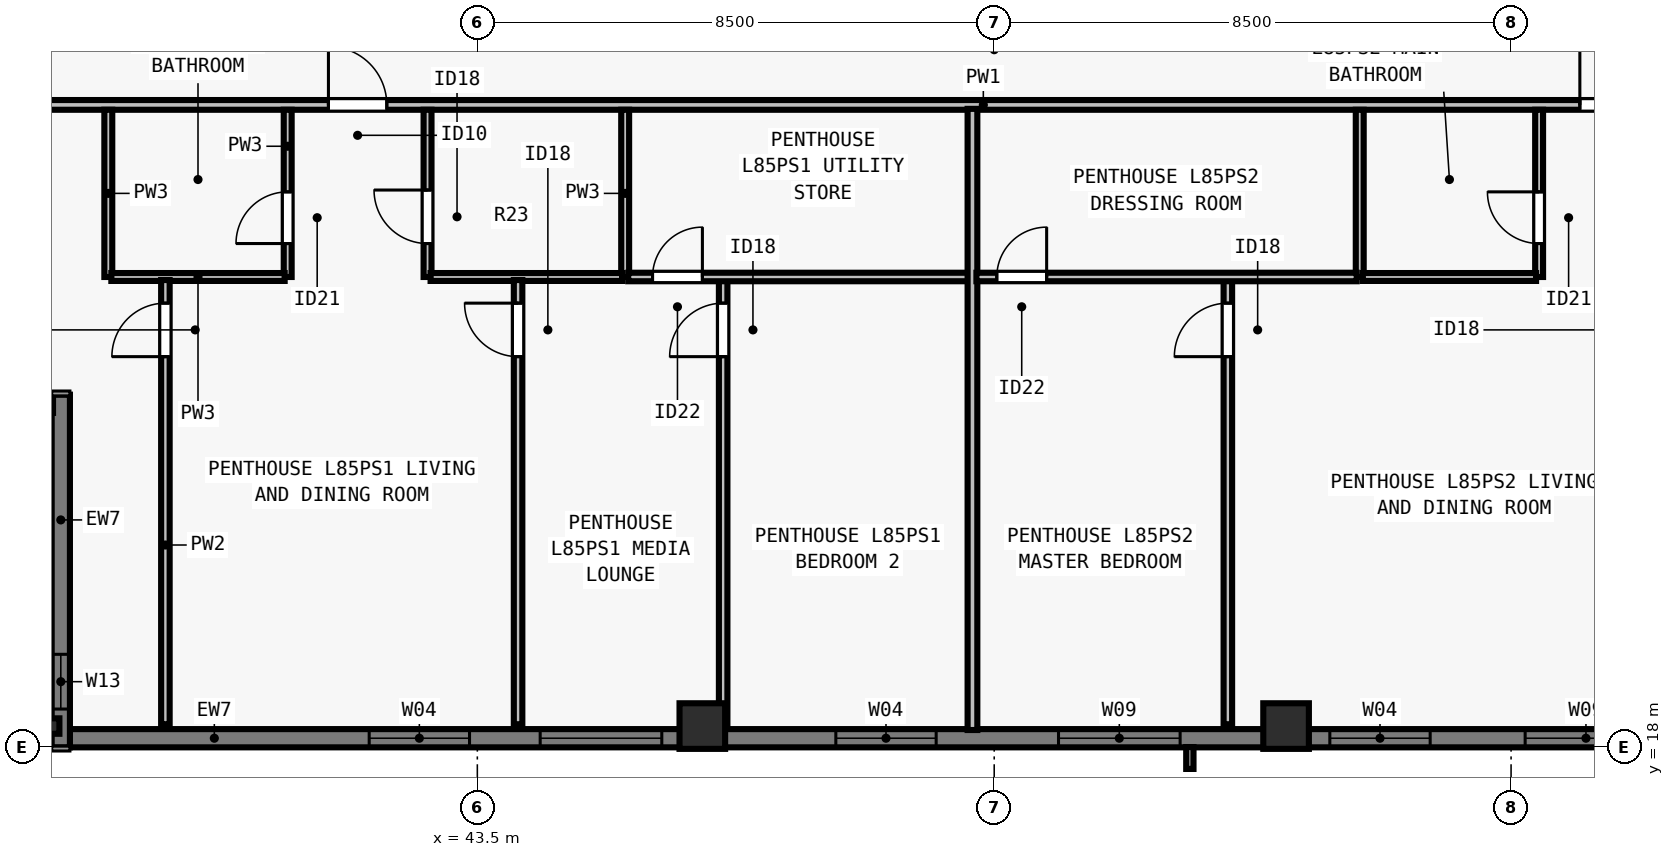
"""IFC4 building model, lengths in metres.
Left out: names, types, materials, properties, quantities, classifications, styles, units other than length and angle.
Written with IfcOpenShell. Run it as: python <this file> out.ifc"""

import sys

from ifc_helpers import new_model, si_unit, direction, frame, frame_2d, origin, origin_2d, place, context, subcontext, project, spatial, rectangle, i_section, extrude, element, fill, save


model = new_model("IFC4")
c1 = context("Model", 3, precision=1e-05, world=origin(), true_north=direction((0.0, 1.0)))
c2 = subcontext(c1, "Body", "Model", "MODEL_VIEW")
j1 = project(units=[si_unit("LENGTHUNIT", "METRE"), si_unit("PLANEANGLEUNIT", "RADIAN")], contexts=[c1])
p1 = place(None, origin())
s1 = spatial("IfcSite", under=j1, at=p1, CompositionType="ELEMENT")
p2 = place(p1, origin())
s2 = spatial("IfcBuilding", under=s1, at=p2, CompositionType="ELEMENT")
p3 = place(p2, frame((0.0, 0.0, 308.5)))
s3 = spatial("IfcBuildingStorey", under=s2, at=p3, CompositionType="ELEMENT", Elevation=308.5)
p4 = place(p3, frame((36.5, 18.35, 0.0), z_axis=(0.0, 0.0, 1.0), x_axis=(1.0, 0.0, 0.0)))
e1 = element("IfcColumn", 1, at=p4, inside=s3, PredefinedType="COLUMN", context=c2, shape_type="SweptSolid", body=[
    extrude(i_section(OverallWidth=0.254, OverallDepth=0.254, WebThickness=0.009, FlangeThickness=0.014, FilletRadius=0.013, at=origin_2d()), origin(), (0.0, 0.0, 1.0), 3.5),
])
for number, where, z_axis, x_axis in (
    (2, (47.2, 18.35, 0.0), (0.0, 0.0, 1.0), (1.0, 0.0, 0.0)),
    (3, (56.8, 18.35, 0.0), (0.0, 0.0, 1.0), (1.0, 0.0, 0.0)),
):
    element("IfcColumn", number, at=place(p3, frame(where, z_axis=z_axis, x_axis=x_axis)), inside=s3, PredefinedType="COLUMN", context=c2, shape_type="SweptSolid", body=[
        extrude(rectangle(XDim=0.75, YDim=0.75, at=origin_2d()), origin(), (0.0, 0.0, 1.0), 3.5),
    ])
p5 = place(p3, frame((67.5, 18.15, 0.0), z_axis=(0.0, 0.0, 1.0), x_axis=(-1.0, 0.0, 0.0)))
e4 = element("IfcWall", 4, at=p5, inside=s3, PredefinedType="SOLIDWALL", context=c2, shape_type="SweptSolid", body=[
    extrude(rectangle(XDim=30.722, YDim=0.3, at=frame_2d((15.361, 0.0))), origin(), (0.0, 0.0, 1.0), 3.29),
])
p6 = place(p5, frame((4.769, 0.0, 0.8)))
e5 = element("IfcOpeningElement", 5, at=p6, cuts=e4, PredefinedType="OPENING", context=c2, shape_type="SweptSolid", body=[
    extrude(rectangle(XDim=2.0, YDim=1.758, at=frame_2d((1.0, 0.879))), frame((0.0, 0.16, 0.0), z_axis=(0.0, -1.0, 0.0), x_axis=(1.0, 0.0, 0.0)), (0.0, 0.0, 1.0), 0.32),
])
p7 = place(p5, frame((8.331, 0.0, 0.8)))
e6 = element("IfcOpeningElement", 6, at=p7, cuts=e4, PredefinedType="OPENING", context=c2, shape_type="SweptSolid", body=[
    extrude(rectangle(XDim=1.65, YDim=1.758, at=frame_2d((0.825, 0.879))), frame((0.0, 0.16, 0.0), z_axis=(0.0, -1.0, 0.0), x_axis=(1.0, 0.0, 0.0)), (0.0, 0.0, 1.0), 0.32),
])
p8 = place(p5, frame((12.442, 0.0, 0.8)))
e7 = element("IfcOpeningElement", 7, at=p8, cuts=e4, PredefinedType="OPENING", context=c2, shape_type="SweptSolid", body=[
    extrude(rectangle(XDim=2.0, YDim=1.758, at=frame_2d((1.0, 0.879))), frame((0.0, 0.16, 0.0), z_axis=(0.0, -1.0, 0.0), x_axis=(1.0, 0.0, 0.0)), (0.0, 0.0, 1.0), 0.32),
])
p9 = place(p5, frame((16.455, 0.0, 0.8)))
e8 = element("IfcOpeningElement", 8, at=p9, cuts=e4, PredefinedType="OPENING", context=c2, shape_type="SweptSolid", body=[
    extrude(rectangle(XDim=1.65, YDim=1.758, at=frame_2d((0.825, 0.879))), frame((0.0, 0.16, 0.0), z_axis=(0.0, -1.0, 0.0), x_axis=(1.0, 0.0, 0.0)), (0.0, 0.0, 1.0), 0.32),
])
p10 = place(p5, frame((20.967, 0.0, 0.8)))
e9 = element("IfcOpeningElement", 9, at=p10, cuts=e4, PredefinedType="OPENING", context=c2, shape_type="SweptSolid", body=[
    extrude(rectangle(XDim=2.0, YDim=1.758, at=frame_2d((1.0, 0.879))), frame((0.0, 0.16, 0.0), z_axis=(0.0, -1.0, 0.0), x_axis=(1.0, 0.0, 0.0)), (0.0, 0.0, 1.0), 0.32),
])
p11 = place(p5, frame((24.128, 0.0, 0.8)))
e10 = element("IfcOpeningElement", 10, at=p11, cuts=e4, PredefinedType="OPENING", context=c2, shape_type="SweptSolid", body=[
    extrude(rectangle(XDim=1.65, YDim=1.758, at=frame_2d((0.825, 0.879))), frame((0.0, 0.16, 0.0), z_axis=(0.0, -1.0, 0.0), x_axis=(1.0, 0.0, 0.0)), (0.0, 0.0, 1.0), 0.32),
])
p12 = place(p3, frame((36.65, 18.0, 0.0), z_axis=(0.0, 0.0, 1.0), x_axis=(0.0, 1.0, 0.0)))
e11 = element("IfcWall", 11, at=p12, inside=s3, PredefinedType="SOLIDWALL", context=c2, shape_type="SweptSolid", body=[
    extrude(rectangle(XDim=5.8, YDim=0.3, at=frame_2d((2.9, 0.0))), origin(), (0.0, 0.0, 1.0), 3.29),
])
p13 = place(p12, frame((0.63, 0.0, 0.8)))
e12 = element("IfcOpeningElement", 12, at=p13, cuts=e11, PredefinedType="OPENING", context=c2, shape_type="SweptSolid", body=[
    extrude(rectangle(XDim=0.9, YDim=1.75, at=frame_2d((0.45, 0.875))), frame((0.0, 0.16, 0.0), z_axis=(0.0, -1.0, 0.0), x_axis=(1.0, 0.0, 0.0)), (0.0, 0.0, 1.0), 0.32),
])
p14 = place(p3, frame((36.522, 23.65, 0.0), z_axis=(0.0, 0.0, 1.0), x_axis=(-1.0, 0.0, 0.0)))
e13 = element("IfcWall", 13, at=p14, inside=s3, PredefinedType="SOLIDWALL", context=c2, shape_type="SweptSolid", body=[
    extrude(rectangle(XDim=5.244, YDim=0.3, at=frame_2d((2.622, 0.0))), origin(), (0.0, 0.0, 1.0), 3.29),
])
p15 = place(p3, frame((31.285, 28.565, 0.0), z_axis=(0.0, 0.0, 1.0), x_axis=(1.0, 0.0, 0.0)))
e14 = element("IfcWall", 14, at=p15, inside=s3, PredefinedType="PARTITIONING", context=c2, shape_type="SweptSolid", body=[
    extrude(rectangle(XDim=41.43, YDim=0.16, at=frame_2d((20.715, 0.0))), origin(), (0.0, 0.0, 1.0), 3.009),
])
p16 = place(p15, frame((9.766, 0.0, 0.0)))
e15 = element("IfcOpeningElement", 15, at=p16, cuts=e14, PredefinedType="OPENING", context=c2, shape_type="SweptSolid", body=[
    extrude(rectangle(XDim=0.96, YDim=2.18, at=frame_2d((0.48, 1.09))), frame((0.0, 0.09, 0.0), z_axis=(0.0, -1.0, 0.0), x_axis=(1.0, 0.0, 0.0)), (0.0, 0.0, 1.0), 0.18),
])
p17 = place(p15, frame((30.346, 0.0, 0.0)))
e16 = element("IfcOpeningElement", 16, at=p17, cuts=e14, PredefinedType="OPENING", context=c2, shape_type="SweptSolid", body=[
    extrude(rectangle(XDim=0.96, YDim=2.18, at=frame_2d((0.48, 1.09))), frame((0.0, 0.09, 0.0), z_axis=(0.0, -1.0, 0.0), x_axis=(1.0, 0.0, 0.0)), (0.0, 0.0, 1.0), 0.18),
])
p18 = place(p3, frame((37.431, 25.735, 0.0), z_axis=(0.0, 0.0, 1.0), x_axis=(0.0, 1.0, 0.0)))
e17 = element("IfcWall", 17, at=p18, inside=s3, PredefinedType="PLUMBINGWALL", context=c2, shape_type="SweptSolid", body=[
    extrude(rectangle(XDim=2.75, YDim=0.13, at=frame_2d((1.375, 0.0))), origin(), (0.0, 0.0, 1.0), 3.29),
])
p19 = place(p3, frame((40.381, 25.735, 0.0), z_axis=(0.0, 0.0, 1.0), x_axis=(0.0, 1.0, 0.0)))
e18 = element("IfcWall", 18, at=p19, inside=s3, PredefinedType="PLUMBINGWALL", context=c2, shape_type="SweptSolid", body=[
    extrude(rectangle(XDim=2.75, YDim=0.13, at=frame_2d((1.375, 0.0))), origin(), (0.0, 0.0, 1.0), 3.29),
])
p20 = place(p19, frame((0.55, 0.0, 0.0)))
e19 = element("IfcOpeningElement", 19, at=p20, cuts=e18, PredefinedType="OPENING", context=c2, shape_type="SweptSolid", body=[
    extrude(rectangle(XDim=0.85, YDim=2.08, at=frame_2d((0.425, 1.04))), frame((0.0, 0.075, 0.0), z_axis=(0.0, -1.0, 0.0), x_axis=(1.0, 0.0, 0.0)), (0.0, 0.0, 1.0), 0.15),
])
p21 = place(p3, frame((37.481, 25.735, 0.0), z_axis=(0.0, 0.0, 1.0), x_axis=(1.0, 0.0, 0.0)))
e20 = element("IfcWall", 20, at=p21, inside=s3, PredefinedType="PLUMBINGWALL", context=c2, shape_type="SweptSolid", body=[
    extrude(rectangle(XDim=2.85, YDim=0.13, at=frame_2d((1.425, 0.0))), origin(), (0.0, 0.0, 1.0), 3.29),
])
p22 = place(p3, frame((45.931, 25.735, 0.0), z_axis=(0.0, 0.0, 1.0), x_axis=(0.0, 1.0, 0.0)))
e21 = element("IfcWall", 21, at=p22, inside=s3, PredefinedType="PLUMBINGWALL", context=c2, shape_type="SweptSolid", body=[
    extrude(rectangle(XDim=2.75, YDim=0.13, at=frame_2d((1.375, 0.0))), origin(), (0.0, 0.0, 1.0), 3.29),
])
p23 = place(p3, frame((42.681, 25.735, 0.0), z_axis=(0.0, 0.0, 1.0), x_axis=(0.0, 1.0, 0.0)))
e22 = element("IfcWall", 22, at=p23, inside=s3, PredefinedType="PLUMBINGWALL", context=c2, shape_type="SweptSolid", body=[
    extrude(rectangle(XDim=2.75, YDim=0.13, at=frame_2d((1.375, 0.0))), origin(), (0.0, 0.0, 1.0), 3.29),
])
p24 = place(p23, frame((0.55, 0.0, 0.0)))
e23 = element("IfcOpeningElement", 23, at=p24, cuts=e22, PredefinedType="OPENING", context=c2, shape_type="SweptSolid", body=[
    extrude(rectangle(XDim=0.88, YDim=2.1, at=frame_2d((0.44, 1.05))), frame((0.0, 0.075, 0.0), z_axis=(0.0, -1.0, 0.0), x_axis=(1.0, 0.0, 0.0)), (0.0, 0.0, 1.0), 0.15),
])
p25 = place(p3, frame((42.731, 25.735, 0.0), z_axis=(0.0, 0.0, 1.0), x_axis=(1.0, 0.0, 0.0)))
e24 = element("IfcWall", 24, at=p25, inside=s3, PredefinedType="PLUMBINGWALL", context=c2, shape_type="SweptSolid", body=[
    extrude(rectangle(XDim=3.15, YDim=0.13, at=frame_2d((1.575, 0.0))), origin(), (0.0, 0.0, 1.0), 3.29),
])
p26 = place(p3, frame((38.37, 18.38, 0.0), z_axis=(0.0, 0.0, 1.0), x_axis=(0.0, 1.0, 0.0)))
e25 = element("IfcWall", 25, at=p26, inside=s3, PredefinedType="PARTITIONING", context=c2, shape_type="SweptSolid", body=[
    extrude(rectangle(XDim=7.305, YDim=0.14, at=frame_2d((3.653, 0.0))), origin(), (0.0, 0.0, 1.0), 2.653),
])
p27 = place(p26, frame((6.045, 0.0, 0.0)))
e26 = element("IfcOpeningElement", 26, at=p27, cuts=e25, PredefinedType="OPENING", context=c2, shape_type="SweptSolid", body=[
    extrude(rectangle(XDim=0.88, YDim=2.1, at=frame_2d((0.44, 1.05))), frame((0.0, 0.08, 0.0), z_axis=(0.0, -1.0, 0.0), x_axis=(1.0, 0.0, 0.0)), (0.0, 0.0, 1.0), 0.16),
])
p28 = place(p3, frame((47.542, 18.38, 0.0), z_axis=(0.0, 0.0, 1.0), x_axis=(0.0, 1.0, 0.0)))
e27 = element("IfcWall", 27, at=p28, inside=s3, PredefinedType="PARTITIONING", context=c2, shape_type="SweptSolid", body=[
    extrude(rectangle(XDim=7.395, YDim=0.14, at=frame_2d((3.698, 0.0))), origin(), (0.0, 0.0, 1.0), 3.009),
])
p29 = place(p28, frame((6.045, 0.0, 0.0)))
e28 = element("IfcOpeningElement", 28, at=p29, cuts=e27, PredefinedType="OPENING", context=c2, shape_type="SweptSolid", body=[
    extrude(rectangle(XDim=0.88, YDim=2.1, at=frame_2d((0.44, 1.05))), frame((0.0, 0.08, 0.0), z_axis=(0.0, -1.0, 0.0), x_axis=(1.0, 0.0, 0.0)), (0.0, 0.0, 1.0), 0.16),
])
p30 = place(p3, frame((45.981, 25.735, 0.0), z_axis=(0.0, 0.0, 1.0), x_axis=(1.0, 0.0, 0.0)))
e29 = element("IfcWall", 29, at=p30, inside=s3, PredefinedType="PARTITIONING", context=c2, shape_type="SweptSolid", body=[
    extrude(rectangle(XDim=5.711, YDim=0.14, at=frame_2d((2.855, 0.0))), origin(), (0.0, 0.0, 1.0), 3.29),
])
p31 = place(p30, frame((0.4, 0.0, 0.0)))
e30 = element("IfcOpeningElement", 30, at=p31, cuts=e29, PredefinedType="OPENING", context=c2, shape_type="SweptSolid", body=[
    extrude(rectangle(XDim=0.82, YDim=2.1, at=frame_2d((0.41, 1.05))), frame((0.0, 0.08, 0.0), z_axis=(0.0, -1.0, 0.0), x_axis=(1.0, 0.0, 0.0)), (0.0, 0.0, 1.0), 0.16),
])
p32 = place(p3, frame((44.17, 18.38, 0.0), z_axis=(0.0, 0.0, 1.0), x_axis=(0.0, 1.0, 0.0)))
e31 = element("IfcWall", 31, at=p32, inside=s3, PredefinedType="PARTITIONING", context=c2, shape_type="SweptSolid", body=[
    extrude(rectangle(XDim=7.305, YDim=0.14, at=frame_2d((3.653, 0.0))), origin(), (0.0, 0.0, 1.0), 3.29),
])
p33 = place(p32, frame((6.045, 0.0, 0.0)))
e32 = element("IfcOpeningElement", 32, at=p33, cuts=e31, PredefinedType="OPENING", context=c2, shape_type="SweptSolid", body=[
    extrude(rectangle(XDim=0.88, YDim=2.1, at=frame_2d((0.44, 1.05))), frame((0.0, 0.08, 0.0), z_axis=(0.0, -1.0, 0.0), x_axis=(1.0, 0.0, 0.0)), (0.0, 0.0, 1.0), 0.16),
])
p34 = place(p3, frame((51.643, 18.285, 0.0), z_axis=(0.0, 0.0, 1.0), x_axis=(0.0, 1.0, 0.0)))
e33 = element("IfcWall", 33, at=p34, inside=s3, PredefinedType="PARTITIONING", context=c2, shape_type="SweptSolid", body=[
    extrude(rectangle(XDim=10.215, YDim=0.16, at=frame_2d((5.107, 0.0))), origin(), (0.0, 0.0, 1.0), 3.009),
])
p35 = place(p3, frame((58.011, 25.735, 0.0), z_axis=(0.0, 0.0, 1.0), x_axis=(0.0, 1.0, 0.0)))
e34 = element("IfcWall", 34, at=p35, inside=s3, PredefinedType="PLUMBINGWALL", context=c2, shape_type="SweptSolid", body=[
    extrude(rectangle(XDim=2.75, YDim=0.13, at=frame_2d((1.375, 0.0))), origin(), (0.0, 0.0, 1.0), 3.29),
])
p36 = place(p3, frame((60.961, 25.735, 0.0), z_axis=(0.0, 0.0, 1.0), x_axis=(0.0, 1.0, 0.0)))
e35 = element("IfcWall", 35, at=p36, inside=s3, PredefinedType="PLUMBINGWALL", context=c2, shape_type="SweptSolid", body=[
    extrude(rectangle(XDim=2.75, YDim=0.13, at=frame_2d((1.375, 0.0))), origin(), (0.0, 0.0, 1.0), 3.29),
])
p37 = place(p36, frame((0.55, 0.0, 0.0)))
e36 = element("IfcOpeningElement", 36, at=p37, cuts=e35, PredefinedType="OPENING", context=c2, shape_type="SweptSolid", body=[
    extrude(rectangle(XDim=0.85, YDim=2.08, at=frame_2d((0.425, 1.04))), frame((0.0, 0.075, 0.0), z_axis=(0.0, -1.0, 0.0), x_axis=(1.0, 0.0, 0.0)), (0.0, 0.0, 1.0), 0.15),
])
p38 = place(p3, frame((58.061, 25.735, 0.0), z_axis=(0.0, 0.0, 1.0), x_axis=(1.0, 0.0, 0.0)))
e37 = element("IfcWall", 37, at=p38, inside=s3, PredefinedType="PLUMBINGWALL", context=c2, shape_type="SweptSolid", body=[
    extrude(rectangle(XDim=2.85, YDim=0.13, at=frame_2d((1.425, 0.0))), origin(), (0.0, 0.0, 1.0), 3.29),
])
p39 = place(p3, frame((55.843, 18.38, 0.0), z_axis=(0.0, 0.0, 1.0), x_axis=(0.0, 1.0, 0.0)))
e38 = element("IfcWall", 38, at=p39, inside=s3, PredefinedType="PARTITIONING", context=c2, shape_type="SweptSolid", body=[
    extrude(rectangle(XDim=7.395, YDim=0.14, at=frame_2d((3.698, 0.0))), origin(), (0.0, 0.0, 1.0), 3.29),
])
p40 = place(p39, frame((6.045, 0.0, 0.0)))
e39 = element("IfcOpeningElement", 39, at=p40, cuts=e38, PredefinedType="OPENING", context=c2, shape_type="SweptSolid", body=[
    extrude(rectangle(XDim=0.88, YDim=2.1, at=frame_2d((0.44, 1.05))), frame((0.0, 0.08, 0.0), z_axis=(0.0, -1.0, 0.0), x_axis=(1.0, 0.0, 0.0)), (0.0, 0.0, 1.0), 0.16),
])
p41 = place(p3, frame((51.708, 25.735, 0.0), z_axis=(0.0, 0.0, 1.0), x_axis=(1.0, 0.0, 0.0)))
e40 = element("IfcWall", 40, at=p41, inside=s3, PredefinedType="PARTITIONING", context=c2, shape_type="SweptSolid", body=[
    extrude(rectangle(XDim=6.254, YDim=0.14, at=frame_2d((3.127, 0.0))), origin(), (0.0, 0.0, 1.0), 3.29),
])
p42 = place(p41, frame((0.335, 0.0, 0.0)))
e41 = element("IfcOpeningElement", 41, at=p42, cuts=e40, PredefinedType="OPENING", context=c2, shape_type="SweptSolid", body=[
    extrude(rectangle(XDim=0.82, YDim=2.1, at=frame_2d((0.41, 1.05))), frame((0.0, 0.08, 0.0), z_axis=(0.0, -1.0, 0.0), x_axis=(1.0, 0.0, 0.0)), (0.0, 0.0, 1.0), 0.16),
])
p43 = place(p6, origin())
e42 = element("IfcWindow", 42, at=p43, inside=s3, PartitioningType="SINGLE_PANEL", PredefinedType="WINDOW", context=c2, shape_type="SweptSolid", body=[
    extrude(rectangle(XDim=2.0, YDim=1.758, at=frame_2d((1.0, 0.879))), frame((0.0, -0.05, 0.0), z_axis=(0.0, -1.0, 0.0), x_axis=(1.0, 0.0, 0.0)), (0.0, 0.0, 1.0), 0.06),
])
fill(e5, e42)
p44 = place(p7, origin())
e43 = element("IfcWindow", 43, at=p44, inside=s3, PartitioningType="SINGLE_PANEL", PredefinedType="WINDOW", context=c2, shape_type="SweptSolid", body=[
    extrude(rectangle(XDim=1.65, YDim=1.758, at=frame_2d((0.825, 0.879))), frame((0.0, -0.05, 0.0), z_axis=(0.0, -1.0, 0.0), x_axis=(1.0, 0.0, 0.0)), (0.0, 0.0, 1.0), 0.06),
])
fill(e6, e43)
p45 = place(p8, origin())
e44 = element("IfcWindow", 44, at=p45, inside=s3, PartitioningType="SINGLE_PANEL", PredefinedType="WINDOW", context=c2, shape_type="SweptSolid", body=[
    extrude(rectangle(XDim=2.0, YDim=1.758, at=frame_2d((1.0, 0.879))), frame((0.0, -0.05, 0.0), z_axis=(0.0, -1.0, 0.0), x_axis=(1.0, 0.0, 0.0)), (0.0, 0.0, 1.0), 0.06),
])
fill(e7, e44)
p46 = place(p9, origin())
e45 = element("IfcWindow", 45, at=p46, inside=s3, PartitioningType="SINGLE_PANEL", PredefinedType="WINDOW", context=c2, shape_type="SweptSolid", body=[
    extrude(rectangle(XDim=1.65, YDim=1.758, at=frame_2d((0.825, 0.879))), frame((0.0, -0.05, 0.0), z_axis=(0.0, -1.0, 0.0), x_axis=(1.0, 0.0, 0.0)), (0.0, 0.0, 1.0), 0.06),
])
fill(e8, e45)
p47 = place(p10, origin())
e46 = element("IfcWindow", 46, at=p47, inside=s3, PartitioningType="SINGLE_PANEL", PredefinedType="WINDOW", context=c2, shape_type="SweptSolid", body=[
    extrude(rectangle(XDim=2.0, YDim=1.758, at=frame_2d((1.0, 0.879))), frame((0.0, -0.05, 0.0), z_axis=(0.0, -1.0, 0.0), x_axis=(1.0, 0.0, 0.0)), (0.0, 0.0, 1.0), 0.06),
])
fill(e9, e46)
p48 = place(p11, origin())
e47 = element("IfcWindow", 47, at=p48, inside=s3, PartitioningType="SINGLE_PANEL", PredefinedType="WINDOW", context=c2, shape_type="SweptSolid", body=[
    extrude(rectangle(XDim=1.65, YDim=1.758, at=frame_2d((0.825, 0.879))), frame((0.0, -0.05, 0.0), z_axis=(0.0, -1.0, 0.0), x_axis=(1.0, 0.0, 0.0)), (0.0, 0.0, 1.0), 0.06),
])
fill(e10, e47)
p49 = place(p13, origin())
e48 = element("IfcWindow", 48, at=p49, inside=s3, PartitioningType="SINGLE_PANEL", PredefinedType="WINDOW", context=c2, shape_type="SweptSolid", body=[
    extrude(rectangle(XDim=0.9, YDim=1.75, at=frame_2d((0.45, 0.875))), frame((0.0, -0.04, 0.0), z_axis=(0.0, -1.0, 0.0), x_axis=(1.0, 0.0, 0.0)), (0.0, 0.0, 1.0), 0.06),
])
fill(e12, e48)
p50 = place(p20, origin())
e49 = element("IfcDoor", 49, at=p50, inside=s3, OperationType="SINGLE_SWING_LEFT", PredefinedType="DOOR", context=c2, shape_type="SweptSolid", body=[
    extrude(rectangle(XDim=0.85, YDim=2.08, at=frame_2d((0.425, 1.04))), frame((0.0, 0.025, 0.0), z_axis=(0.0, -1.0, 0.0), x_axis=(1.0, 0.0, 0.0)), (0.0, 0.0, 1.0), 0.05),
])
fill(e19, e49)
p51 = place(p24, origin())
e50 = element("IfcDoor", 50, at=p51, inside=s3, OperationType="SINGLE_SWING_RIGHT", PredefinedType="DOOR", context=c2, shape_type="SweptSolid", body=[
    extrude(rectangle(XDim=0.88, YDim=2.1, at=frame_2d((0.44, 1.05))), frame((0.0, 0.025, 0.0), z_axis=(0.0, -1.0, 0.0), x_axis=(1.0, 0.0, 0.0)), (0.0, 0.0, 1.0), 0.05),
])
fill(e23, e50)
p52 = place(p27, origin())
e51 = element("IfcDoor", 51, at=p52, inside=s3, OperationType="SINGLE_SWING_LEFT", PredefinedType="DOOR", context=c2, shape_type="SweptSolid", body=[
    extrude(rectangle(XDim=0.88, YDim=2.1, at=frame_2d((0.44, 1.05))), frame((0.0, 0.025, 0.0), z_axis=(0.0, -1.0, 0.0), x_axis=(1.0, 0.0, 0.0)), (0.0, 0.0, 1.0), 0.05),
])
fill(e26, e51)
p53 = place(p31, origin())
e52 = element("IfcDoor", 52, at=p53, inside=s3, OperationType="SINGLE_SWING_RIGHT", PredefinedType="DOOR", context=c2, shape_type="SweptSolid", body=[
    extrude(rectangle(XDim=0.82, YDim=2.1, at=frame_2d((0.41, 1.05))), frame((0.0, 0.025, 0.0), z_axis=(0.0, -1.0, 0.0), x_axis=(1.0, 0.0, 0.0)), (0.0, 0.0, 1.0), 0.05),
])
fill(e30, e52)
p54 = place(p29, origin())
e53 = element("IfcDoor", 53, at=p54, inside=s3, OperationType="SINGLE_SWING_LEFT", PredefinedType="DOOR", context=c2, shape_type="SweptSolid", body=[
    extrude(rectangle(XDim=0.88, YDim=2.1, at=frame_2d((0.44, 1.05))), frame((0.0, 0.025, 0.0), z_axis=(0.0, -1.0, 0.0), x_axis=(1.0, 0.0, 0.0)), (0.0, 0.0, 1.0), 0.05),
])
fill(e28, e53)
p55 = place(p33, origin())
e54 = element("IfcDoor", 54, at=p55, inside=s3, OperationType="SINGLE_SWING_RIGHT", PredefinedType="DOOR", context=c2, shape_type="SweptSolid", body=[
    extrude(rectangle(XDim=0.88, YDim=2.1, at=frame_2d((0.44, 1.05))), frame((0.0, 0.025, 0.0), z_axis=(0.0, -1.0, 0.0), x_axis=(1.0, 0.0, 0.0)), (0.0, 0.0, 1.0), 0.05),
])
fill(e32, e54)
p56 = place(p16, origin())
e55 = element("IfcDoor", 55, at=p56, inside=s3, OperationType="SINGLE_SWING_LEFT", PredefinedType="DOOR", context=c2, shape_type="SweptSolid", body=[
    extrude(rectangle(XDim=0.96, YDim=2.18, at=frame_2d((0.48, 1.09))), frame((0.0, 0.025, 0.0), z_axis=(0.0, -1.0, 0.0), x_axis=(1.0, 0.0, 0.0)), (0.0, 0.0, 1.0), 0.05),
])
fill(e15, e55)
p57 = place(p37, origin())
e56 = element("IfcDoor", 56, at=p57, inside=s3, OperationType="SINGLE_SWING_RIGHT", PredefinedType="DOOR", context=c2, shape_type="SweptSolid", body=[
    extrude(rectangle(XDim=0.85, YDim=2.08, at=frame_2d((0.425, 1.04))), frame((0.0, 0.025, 0.0), z_axis=(0.0, -1.0, 0.0), x_axis=(1.0, 0.0, 0.0)), (0.0, 0.0, 1.0), 0.05),
])
fill(e36, e56)
p58 = place(p42, origin())
e57 = element("IfcDoor", 57, at=p58, inside=s3, OperationType="SINGLE_SWING_RIGHT", PredefinedType="DOOR", context=c2, shape_type="SweptSolid", body=[
    extrude(rectangle(XDim=0.82, YDim=2.1, at=frame_2d((0.41, 1.05))), frame((0.0, 0.025, 0.0), z_axis=(0.0, -1.0, 0.0), x_axis=(1.0, 0.0, 0.0)), (0.0, 0.0, 1.0), 0.05),
])
fill(e41, e57)
p59 = place(p40, origin())
e58 = element("IfcDoor", 58, at=p59, inside=s3, OperationType="SINGLE_SWING_LEFT", PredefinedType="DOOR", context=c2, shape_type="SweptSolid", body=[
    extrude(rectangle(XDim=0.88, YDim=2.1, at=frame_2d((0.44, 1.05))), frame((0.0, 0.025, 0.0), z_axis=(0.0, -1.0, 0.0), x_axis=(1.0, 0.0, 0.0)), (0.0, 0.0, 1.0), 0.05),
])
fill(e39, e58)
p60 = place(p17, origin())
e59 = element("IfcDoor", 59, at=p60, inside=s3, OperationType="SINGLE_SWING_LEFT", PredefinedType="DOOR", context=c2, shape_type="SweptSolid", body=[
    extrude(rectangle(XDim=0.96, YDim=2.18, at=frame_2d((0.48, 1.09))), frame((0.0, 0.025, 0.0), z_axis=(0.0, -1.0, 0.0), x_axis=(1.0, 0.0, 0.0)), (0.0, 0.0, 1.0), 0.05),
])
fill(e16, e59)
save(model, sys.argv[1])
